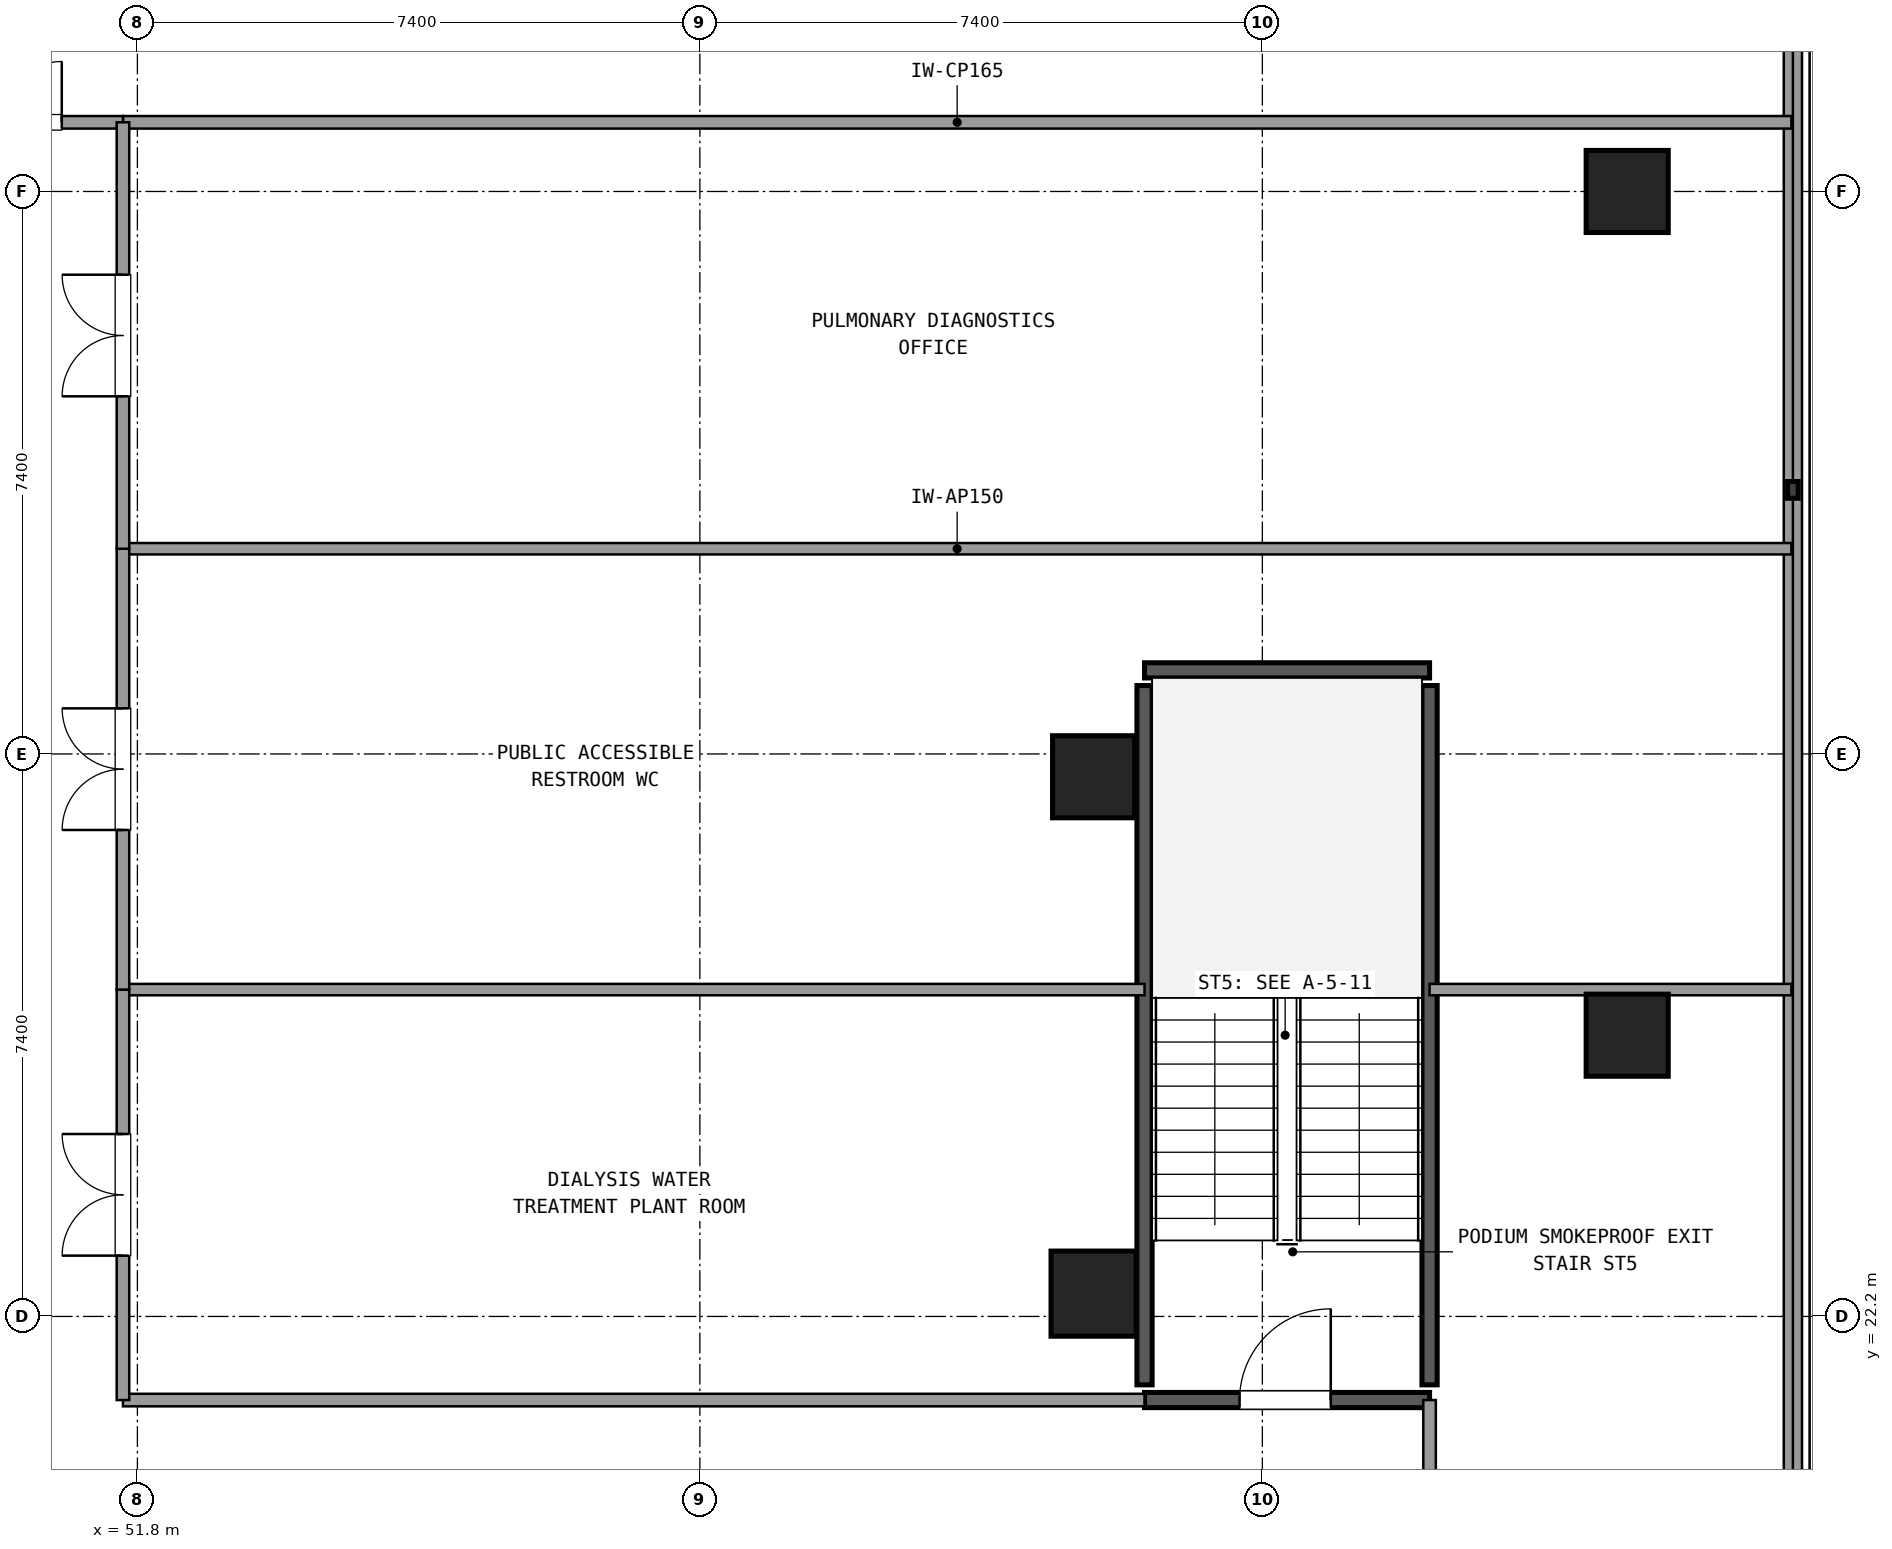
"""IFC4 building model, lengths in metres.
Left out: names, types, materials, properties, quantities, classifications, styles, units other than length and angle.
Written with IfcOpenShell. Run it as: python <this file> out.ifc"""

import sys

from ifc_helpers import new_model, si_unit, direction, frame, frame_2d, origin, origin_2d, place, context, subcontext, project, spatial, rectangle, circle, extrude, element, fill, save


model = new_model("IFC4")
c1 = context("Model", 3, precision=1e-05, world=origin(), true_north=direction((0.0, 1.0)))
c2 = subcontext(c1, "Body", "Model", "MODEL_VIEW")
j1 = project(units=[si_unit("LENGTHUNIT", "METRE"), si_unit("PLANEANGLEUNIT", "RADIAN")], contexts=[c1])
p1 = place(None, origin())
s1 = spatial("IfcSite", under=j1, at=p1, CompositionType="ELEMENT")
p2 = place(p1, origin())
s2 = spatial("IfcBuilding", under=s1, at=p2, CompositionType="ELEMENT")
p3 = place(p2, frame((0.0, 0.0, 14.4)))
s3 = spatial("IfcBuildingStorey", under=s2, at=p3, CompositionType="ELEMENT", Elevation=14.4)
p4 = place(p3, frame((64.38, 22.5, 0.0), z_axis=(0.0, 0.0, 1.0), x_axis=(1.0, 0.0, 0.0)))
e1 = element("IfcColumn", 1, at=p4, inside=s3, PredefinedType="COLUMN", context=c2, shape_type="SweptSolid", body=[
    extrude(circle(Radius=0.56, at=origin_2d()), origin(), (0.0, 0.0, 1.0), 4.5),
])
for number, where, z_axis, x_axis in (
    (2, (64.38, 29.3, 0.0), (0.0, 0.0, 1.0), (1.0, 0.0, 0.0)),
    (3, (71.4, 25.9, 0.0), (0.0, 0.0, 1.0), (1.0, 0.0, 0.0)),
    (4, (71.4, 37.0, 0.0), (0.0, 0.0, 1.0), (1.0, 0.0, 0.0)),
):
    element("IfcColumn", number, at=place(p3, frame(where, z_axis=z_axis, x_axis=x_axis)), inside=s3, PredefinedType="COLUMN", context=c2, shape_type="SweptSolid", body=[
        extrude(rectangle(XDim=1.08, YDim=1.08, at=origin_2d()), origin(), (0.0, 0.0, 1.0), 4.5),
    ])
p5 = place(p3, frame((73.58, 4.379, 0.0), z_axis=(0.0, 0.0, 1.0), x_axis=(0.0, 1.0, 0.0)))
e5 = element("IfcWall", 5, at=p5, inside=s3, PredefinedType="SOLIDWALL", context=c2, shape_type="SweptSolid", body=[
    extrude(rectangle(XDim=43.042, YDim=0.24, at=frame_2d((21.521, 0.0))), origin(), (0.0, 0.0, 1.0), 0.85),
])
p6 = place(p3, frame((65.05, 21.1, 0.0), z_axis=(0.0, 0.0, 1.0), x_axis=(1.0, 0.0, 0.0)))
e6 = element("IfcWall", 6, at=p6, inside=s3, PredefinedType="SHEAR", context=c2, shape_type="SweptSolid", body=[
    extrude(rectangle(XDim=3.75, YDim=0.2, at=frame_2d((1.875, 0.0))), origin(), (0.0, 0.0, 1.0), 4.2),
])
p7 = place(p6, frame((1.25, 0.0, 0.0)))
e7 = element("IfcOpeningElement", 7, at=p7, cuts=e6, PredefinedType="OPENING", context=c2, shape_type="SweptSolid", body=[
    extrude(rectangle(XDim=1.2, YDim=2.15, at=frame_2d((0.6, 1.075))), frame((0.0, 0.11, 0.0), z_axis=(0.0, -1.0, 0.0), x_axis=(1.0, 0.0, 0.0)), (0.0, 0.0, 1.0), 0.22),
])
p8 = place(p3, frame((65.05, 30.7, 0.0), z_axis=(0.0, 0.0, 1.0), x_axis=(1.0, 0.0, 0.0)))
e8 = element("IfcWall", 8, at=p8, inside=s3, PredefinedType="SHEAR", context=c2, shape_type="SweptSolid", body=[
    extrude(rectangle(XDim=3.75, YDim=0.2, at=frame_2d((1.875, 0.0))), origin(), (0.0, 0.0, 1.0), 4.2),
])
for number, where, z_axis, x_axis in (
    (9, (65.05, 21.3, 0.0), (0.0, 0.0, 1.0), (0.0, 1.0, 0.0)),
    (10, (68.8, 21.3, 0.0), (0.0, 0.0, 1.0), (0.0, 1.0, 0.0)),
):
    element("IfcWall", number, at=place(p3, frame(where, z_axis=z_axis, x_axis=x_axis)), inside=s3, PredefinedType="SHEAR", context=c2, shape_type="SweptSolid", body=[
        extrude(rectangle(XDim=9.2, YDim=0.2, at=frame_2d((4.6, 0.0))), origin(), (0.0, 0.0, 1.0), 4.2),
    ])
p9 = place(p3, frame((51.61, 37.91, 0.0), z_axis=(0.0, 0.0, 1.0), x_axis=(1.0, 0.0, 0.0)))
e11 = element("IfcWall", 11, at=p9, inside=s3, PredefinedType="PARTITIONING", context=c2, shape_type="SweptSolid", body=[
    extrude(rectangle(XDim=21.95, YDim=0.165, at=frame_2d((10.975, 0.0))), origin(), (0.0, 0.0, 1.0), 3.21),
])
p10 = place(p3, frame((68.8, 18.17, 0.0), z_axis=(0.0, 0.0, 1.0), x_axis=(0.0, 1.0, 0.0)))
e12 = element("IfcWall", 12, at=p10, inside=s3, PredefinedType="PARTITIONING", context=c2, shape_type="SweptSolid", body=[
    extrude(rectangle(XDim=2.93, YDim=0.165, at=frame_2d((1.465, 0.0))), origin(), (0.0, 0.0, 1.0), 3.21),
])
p11 = place(p3, frame((51.61, 21.1, 0.0), z_axis=(0.0, 0.0, 1.0), x_axis=(1.0, 0.0, 0.0)))
e13 = element("IfcWall", 13, at=p11, inside=s3, PredefinedType="PARTITIONING", context=c2, shape_type="SweptSolid", body=[
    extrude(rectangle(XDim=13.44, YDim=0.165, at=frame_2d((6.72, 0.0))), origin(), (0.0, 0.0, 1.0), 3.21),
])
p12 = place(p3, frame((48.4, 37.91, 0.0), z_axis=(0.0, 0.0, 1.0), x_axis=(1.0, 0.0, 0.0)))
e14 = element("IfcWall", 14, at=p12, inside=s3, PredefinedType="PARTITIONING", context=c2, shape_type="SweptSolid", body=[
    extrude(rectangle(XDim=3.21, YDim=0.165, at=frame_2d((1.605, 0.0))), origin(), (0.0, 0.0, 1.0), 3.21),
])
p13 = place(p12, frame((0.805, 0.0, 0.0)))
e15 = element("IfcOpeningElement", 15, at=p13, cuts=e14, PredefinedType="OPENING", context=c2, shape_type="SweptSolid", body=[
    extrude(rectangle(XDim=1.6, YDim=2.2, at=frame_2d((0.8, 1.1))), frame((0.0, 0.093, 0.0), z_axis=(0.0, -1.0, 0.0), x_axis=(1.0, 0.0, 0.0)), (0.0, 0.0, 1.0), 0.185),
])
p14 = place(p3, frame((51.61, 26.5, 0.0), z_axis=(0.0, 0.0, 1.0), x_axis=(1.0, 0.0, 0.0)))
e16 = element("IfcWall", 16, at=p14, inside=s3, PredefinedType="PARTITIONING", context=c2, shape_type="SweptSolid", body=[
    extrude(rectangle(XDim=13.44, YDim=0.15, at=frame_2d((6.72, 0.0))), origin(), (0.0, 0.0, 1.0), 3.21),
])
p15 = place(p3, frame((68.8, 26.5, 0.0), z_axis=(0.0, 0.0, 1.0), x_axis=(1.0, 0.0, 0.0)))
e17 = element("IfcWall", 17, at=p15, inside=s3, PredefinedType="PARTITIONING", context=c2, shape_type="SweptSolid", body=[
    extrude(rectangle(XDim=4.76, YDim=0.15, at=frame_2d((2.38, 0.0))), origin(), (0.0, 0.0, 1.0), 3.21),
])
p16 = place(p3, frame((51.61, 32.3, 0.0), z_axis=(0.0, 0.0, 1.0), x_axis=(1.0, 0.0, 0.0)))
e18 = element("IfcWall", 18, at=p16, inside=s3, PredefinedType="PARTITIONING", context=c2, shape_type="SweptSolid", body=[
    extrude(rectangle(XDim=21.95, YDim=0.15, at=frame_2d((10.975, 0.0))), origin(), (0.0, 0.0, 1.0), 3.21),
])
p17 = place(p3, frame((51.61, 21.1, 0.0), z_axis=(0.0, 0.0, 1.0), x_axis=(0.0, 1.0, 0.0)))
e19 = element("IfcWall", 19, at=p17, inside=s3, PredefinedType="PARTITIONING", context=c2, shape_type="SweptSolid", body=[
    extrude(rectangle(XDim=5.4, YDim=0.165, at=frame_2d((2.7, 0.0))), origin(), (0.0, 0.0, 1.0), 3.21),
])
p18 = place(p17, frame((1.9, 0.0, 0.0)))
e20 = element("IfcOpeningElement", 20, at=p18, cuts=e19, PredefinedType="OPENING", context=c2, shape_type="SweptSolid", body=[
    extrude(rectangle(XDim=1.6, YDim=2.2, at=frame_2d((0.8, 1.1))), frame((0.0, 0.093, 0.0), z_axis=(0.0, -1.0, 0.0), x_axis=(1.0, 0.0, 0.0)), (0.0, 0.0, 1.0), 0.185),
])
p19 = place(p3, frame((51.61, 26.5, 0.0), z_axis=(0.0, 0.0, 1.0), x_axis=(0.0, 1.0, 0.0)))
e21 = element("IfcWall", 21, at=p19, inside=s3, PredefinedType="PARTITIONING", context=c2, shape_type="SweptSolid", body=[
    extrude(rectangle(XDim=5.8, YDim=0.165, at=frame_2d((2.9, 0.0))), origin(), (0.0, 0.0, 1.0), 3.21),
])
p20 = place(p19, frame((2.1, 0.0, 0.0)))
e22 = element("IfcOpeningElement", 22, at=p20, cuts=e21, PredefinedType="OPENING", context=c2, shape_type="SweptSolid", body=[
    extrude(rectangle(XDim=1.6, YDim=2.2, at=frame_2d((0.8, 1.1))), frame((0.0, 0.093, 0.0), z_axis=(0.0, -1.0, 0.0), x_axis=(1.0, 0.0, 0.0)), (0.0, 0.0, 1.0), 0.185),
])
p21 = place(p3, frame((51.61, 32.3, 0.0), z_axis=(0.0, 0.0, 1.0), x_axis=(0.0, 1.0, 0.0)))
e23 = element("IfcWall", 23, at=p21, inside=s3, PredefinedType="PARTITIONING", context=c2, shape_type="SweptSolid", body=[
    extrude(rectangle(XDim=5.61, YDim=0.165, at=frame_2d((2.805, 0.0))), origin(), (0.0, 0.0, 1.0), 3.21),
])
p22 = place(p21, frame((2.005, 0.0, 0.0)))
e24 = element("IfcOpeningElement", 24, at=p22, cuts=e23, PredefinedType="OPENING", context=c2, shape_type="SweptSolid", body=[
    extrude(rectangle(XDim=1.6, YDim=2.2, at=frame_2d((0.8, 1.1))), frame((0.0, 0.093, 0.0), z_axis=(0.0, -1.0, 0.0), x_axis=(1.0, 0.0, 0.0)), (0.0, 0.0, 1.0), 0.185),
])
p23 = place(p7, origin())
e25 = element("IfcDoor", 25, at=p23, inside=s3, OperationType="SINGLE_SWING_RIGHT", PredefinedType="DOOR", context=c2, shape_type="SweptSolid", body=[
    extrude(rectangle(XDim=1.2, YDim=2.15, at=frame_2d((0.6, 1.075))), frame((0.0, 0.025, 0.0), z_axis=(0.0, -1.0, 0.0), x_axis=(1.0, 0.0, 0.0)), (0.0, 0.0, 1.0), 0.05),
])
fill(e7, e25)
p24 = place(p13, origin())
e26 = element("IfcDoor", 26, at=p24, inside=s3, OperationType="DOUBLE_DOOR_SINGLE_SWING", PredefinedType="DOOR", context=c2, shape_type="SweptSolid", body=[
    extrude(rectangle(XDim=1.6, YDim=2.2, at=frame_2d((0.8, 1.1))), frame((0.0, 0.025, 0.0), z_axis=(0.0, -1.0, 0.0), x_axis=(1.0, 0.0, 0.0)), (0.0, 0.0, 1.0), 0.05),
])
fill(e15, e26)
p25 = place(p18, origin())
e27 = element("IfcDoor", 27, at=p25, inside=s3, OperationType="DOUBLE_DOOR_SINGLE_SWING", PredefinedType="DOOR", context=c2, shape_type="SweptSolid", body=[
    extrude(rectangle(XDim=1.6, YDim=2.2, at=frame_2d((0.8, 1.1))), frame((0.0, 0.025, 0.0), z_axis=(0.0, -1.0, 0.0), x_axis=(1.0, 0.0, 0.0)), (0.0, 0.0, 1.0), 0.05),
])
fill(e20, e27)
p26 = place(p20, origin())
e28 = element("IfcDoor", 28, at=p26, inside=s3, OperationType="DOUBLE_DOOR_SINGLE_SWING", PredefinedType="DOOR", context=c2, shape_type="SweptSolid", body=[
    extrude(rectangle(XDim=1.6, YDim=2.2, at=frame_2d((0.8, 1.1))), frame((0.0, 0.025, 0.0), z_axis=(0.0, -1.0, 0.0), x_axis=(1.0, 0.0, 0.0)), (0.0, 0.0, 1.0), 0.05),
])
fill(e22, e28)
p27 = place(p22, origin())
e29 = element("IfcDoor", 29, at=p27, inside=s3, OperationType="DOUBLE_DOOR_SINGLE_SWING", PredefinedType="DOOR", context=c2, shape_type="SweptSolid", body=[
    extrude(rectangle(XDim=1.6, YDim=2.2, at=frame_2d((0.8, 1.1))), frame((0.0, 0.025, 0.0), z_axis=(0.0, -1.0, 0.0), x_axis=(1.0, 0.0, 0.0)), (0.0, 0.0, 1.0), 0.05),
])
fill(e24, e29)
save(model, sys.argv[1])
